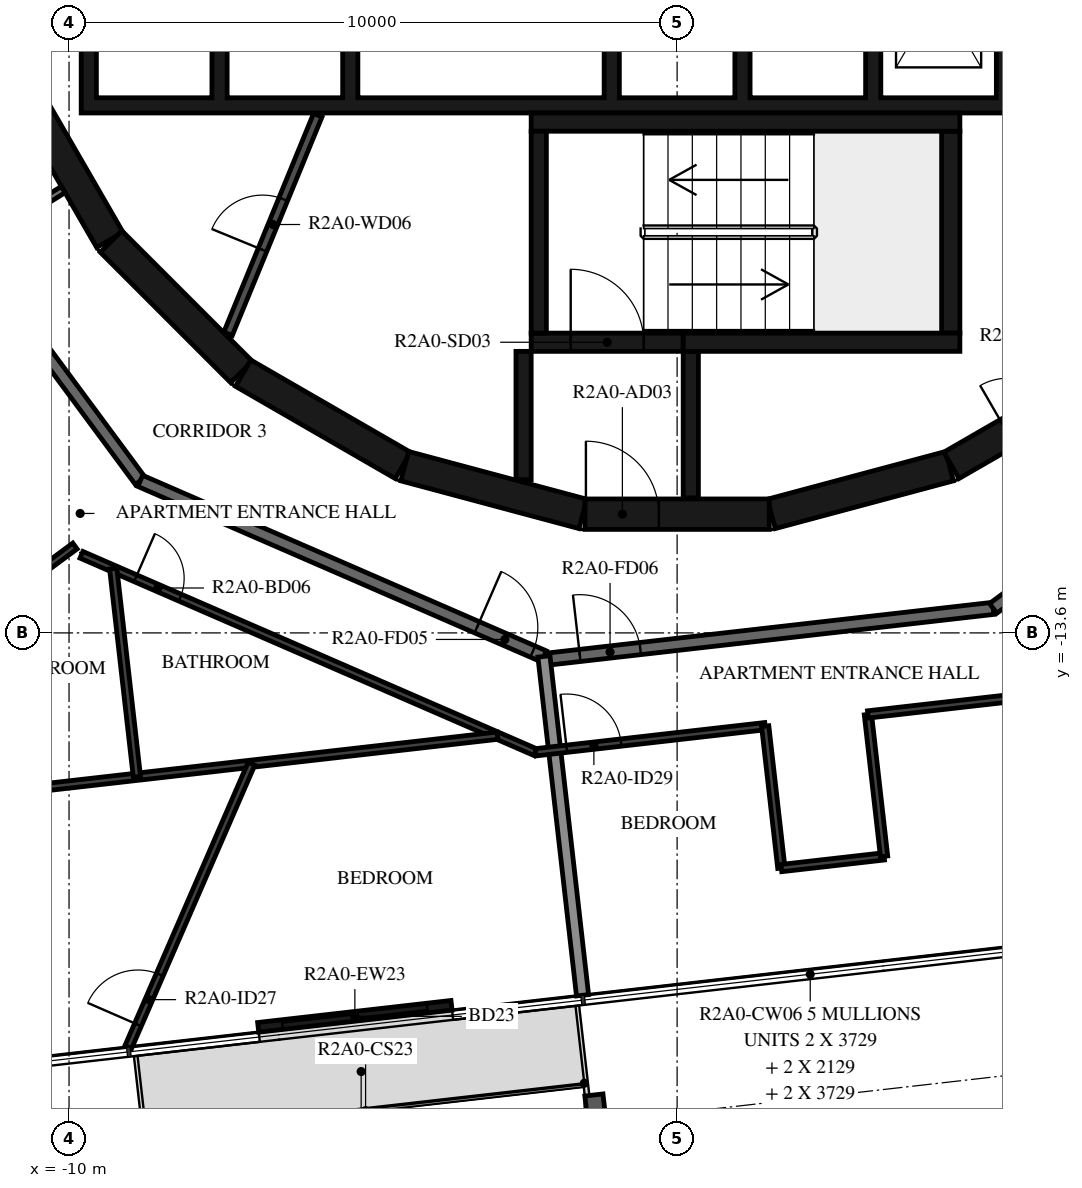
"""IFC4 building model, lengths in metres.
Left out: names, types, materials, properties, quantities, classifications, styles, units other than length and angle.
Written with IfcOpenShell. Run it as: python <this file> out.ifc"""

import sys

from ifc_helpers import new_model, si_unit, direction, frame, frame_2d, origin, origin_2d, place, context, subcontext, project, spatial, polyline, rectangle, i_section, outline, extrude, element, fill, save


model = new_model("IFC4")
c1 = context("Model", 3, precision=1e-05, world=origin(), true_north=direction((0.0, 1.0)))
c2 = subcontext(c1, "Body", "Model", "MODEL_VIEW")
j1 = project(units=[si_unit("LENGTHUNIT", "METRE"), si_unit("PLANEANGLEUNIT", "RADIAN")], contexts=[c1])
p1 = place(None, origin())
s1 = spatial("IfcSite", under=j1, at=p1, CompositionType="ELEMENT")
p2 = place(p1, origin())
s2 = spatial("IfcBuilding", under=s1, at=p2, CompositionType="ELEMENT")
p3 = place(p2, frame((0.0, 0.0, 83.7)))
s3 = spatial("IfcBuildingStorey", under=s2, at=p3, CompositionType="ELEMENT", Elevation=83.7)
p4 = place(p3, frame((-1.317, -21.646, -0.38), z_axis=(0.0, 0.0, 1.0), x_axis=(-0.993571881569, -0.113202986513, 0.0)))
e1 = element("IfcColumn", 1, at=p4, inside=s3, PredefinedType="COLUMN", context=c2, shape_type="SweptSolid", body=[
    extrude(i_section(OverallWidth=0.3, OverallDepth=0.9, WebThickness=0.019, FlangeThickness=0.035, FilletRadius=0.03, at=origin_2d()), origin(), (0.0, 0.0, 1.0), 3.5),
])
p5 = place(p3, frame((-6.889, -20.086, 0.0), z_axis=(0.0, 0.0, 1.0), x_axis=(0.993578576686, 0.113144208648, 0.0)))
e2 = element("IfcWall", 2, at=p5, inside=s3, PredefinedType="STANDARD", context=c2, shape_type="SweptSolid", body=[
    extrude(rectangle(XDim=3.2, YDim=0.16, at=frame_2d((1.6, 0.0))), origin(), (0.0, 0.0, 1.0), 3.12),
])
p6 = place(p5, frame((0.4, 0.0, 0.0)))
e3 = element("IfcOpeningElement", 3, at=p6, cuts=e2, PredefinedType="OPENING", context=c2, shape_type="SweptSolid", body=[
    extrude(rectangle(XDim=2.4, YDim=2.4, at=frame_2d((1.2, 1.2))), frame((0.0, 0.09, 0.0), z_axis=(0.0, -1.0, 0.0), x_axis=(1.0, 0.0, 0.0)), (0.0, 0.0, 1.0), 0.18),
])
p7 = place(p3, frame((1.55, -11.643, 0.0), z_axis=(0.0, 0.0, 1.0), x_axis=(0.965948410781, 0.258734743916, 0.0)))
e4 = element("IfcWall", 4, at=p7, inside=s3, PredefinedType="SHEAR", context=c2, shape_type="SweptSolid", body=[
    extrude(rectangle(XDim=3.033, YDim=0.5, at=frame_2d((1.516, 0.0))), origin(), (0.0, 0.0, 1.0), 3.12),
])
p8 = place(p3, frame((4.51, -10.845, 0.0), z_axis=(0.0, 0.0, 1.0), x_axis=(0.865975092491, 0.500087131594, 0.0)))
e5 = element("IfcWall", 5, at=p8, inside=s3, PredefinedType="SHEAR", context=c2, shape_type="SweptSolid", body=[
    extrude(rectangle(XDim=3.033, YDim=0.5, at=frame_2d((1.516, 0.0))), origin(), (0.0, 0.0, 1.0), 3.12),
])
p9 = place(p8, frame((1.066, 0.0, 0.0)))
e6 = element("IfcOpeningElement", 6, at=p9, cuts=e5, PredefinedType="OPENING", context=c2, shape_type="SweptSolid", body=[
    extrude(rectangle(XDim=0.9, YDim=2.1, at=frame_2d((0.45, 1.05))), frame((0.0, 0.26, 0.0), z_axis=(0.0, -1.0, 0.0), x_axis=(1.0, 0.0, 0.0)), (0.0, 0.0, 1.0), 0.52),
])
p10 = place(p3, frame((-10.845, -4.51, 0.0), z_axis=(0.0, 0.0, 1.0), x_axis=(0.500087131594, -0.865975092491, 0.0)))
e7 = element("IfcWall", 7, at=p10, inside=s3, PredefinedType="SHEAR", context=c2, shape_type="SweptSolid", body=[
    extrude(rectangle(XDim=3.033, YDim=0.5, at=frame_2d((1.516, 0.0))), origin(), (0.0, 0.0, 1.0), 3.12),
])
p11 = place(p3, frame((-9.308, -7.164, 0.0), z_axis=(0.0, 0.0, 1.0), x_axis=(0.707106781187, -0.707106781187, 0.0)))
e8 = element("IfcWall", 8, at=p11, inside=s3, PredefinedType="SHEAR", context=c2, shape_type="SweptSolid", body=[
    extrude(rectangle(XDim=3.032, YDim=0.5, at=frame_2d((1.516, 0.0))), origin(), (0.0, 0.0, 1.0), 3.12),
])
for number, where, z_axis, x_axis in (
    (9, (-7.137, -9.329, 0.0), (0.0, 0.0, 1.0), (0.866, -0.5, 0.0)),
    (10, (-4.479, -10.858, 0.0), (0.0, 0.0, 1.0), (0.966, -0.259, 0.0)),
):
    element("IfcWall", number, at=place(p3, frame(where, z_axis=z_axis, x_axis=x_axis)), inside=s3, PredefinedType="SHEAR", context=c2, shape_type="SweptSolid", body=[
        extrude(rectangle(XDim=3.033, YDim=0.5, at=frame_2d((1.516, 0.0))), origin(), (0.0, 0.0, 1.0), 3.12),
    ])
p12 = place(p3, frame((-1.516, -11.647, 0.0), z_axis=(0.0, 0.0, 1.0), x_axis=(1.0, 0.0, 0.0)))
e11 = element("IfcWall", 11, at=p12, inside=s3, PredefinedType="SHEAR", context=c2, shape_type="SweptSolid", body=[
    extrude(rectangle(XDim=3.033, YDim=0.5, at=frame_2d((1.516, 0.0))), origin(), (0.0, 0.0, 1.0), 3.12),
])
p13 = place(p12, frame((0.016, 0.0, 0.0)))
e12 = element("IfcOpeningElement", 12, at=p13, cuts=e11, PredefinedType="OPENING", context=c2, shape_type="SweptSolid", body=[
    extrude(rectangle(XDim=1.2, YDim=2.1, at=frame_2d((0.6, 1.05))), frame((0.0, 0.26, 0.0), z_axis=(0.0, -1.0, 0.0), x_axis=(1.0, 0.0, 0.0)), (0.0, 0.0, 1.0), 0.52),
])
p14 = place(p3, frame((-2.275, -8.67, 0.0), z_axis=(0.0, 0.0, 1.0), x_axis=(0.0, 1.0, 0.0)))
e13 = element("IfcWall", 13, at=p14, inside=s3, PredefinedType="SHEAR", context=c2, shape_type="SweptSolid", body=[
    extrude(rectangle(XDim=3.32, YDim=0.25, at=frame_2d((1.66, 0.0))), origin(), (0.0, 0.0, 1.0), 3.12),
])
p15 = place(p3, frame((-2.4, -5.2, 0.0), z_axis=(0.0, 0.0, 1.0), x_axis=(1.0, 0.0, 0.0)))
e14 = element("IfcWall", 14, at=p15, inside=s3, PredefinedType="SHEAR", context=c2, shape_type="SweptSolid", body=[
    extrude(rectangle(XDim=7.05, YDim=0.3, at=frame_2d((3.525, 0.0))), origin(), (0.0, 0.0, 1.0), 3.12),
])
p16 = place(p3, frame((4.5, -8.67, 0.0), z_axis=(0.0, 0.0, 1.0), x_axis=(0.0, 1.0, 0.0)))
e15 = element("IfcWall", 15, at=p16, inside=s3, PredefinedType="SHEAR", context=c2, shape_type="SweptSolid", body=[
    extrude(rectangle(XDim=3.32, YDim=0.3, at=frame_2d((1.66, 0.0))), origin(), (0.0, 0.0, 1.0), 3.12),
])
p17 = place(p3, frame((0.1, -8.82, 0.0), z_axis=(0.0, 0.0, 1.0), x_axis=(1.0, 0.0, 0.0)))
e16 = element("IfcWall", 16, at=p17, inside=s3, PredefinedType="SHEAR", context=c2, shape_type="SweptSolid", body=[
    extrude(rectangle(XDim=4.55, YDim=0.3, at=frame_2d((2.275, 0.0))), origin(), (0.0, 0.0, 1.0), 3.12),
])
p18 = place(p3, frame((-2.4, -8.82, 0.0), z_axis=(0.0, 0.0, 1.0), x_axis=(1.0, 0.0, 0.0)))
e17 = element("IfcWall", 17, at=p18, inside=s3, PredefinedType="SHEAR", context=c2, shape_type="SweptSolid", body=[
    extrude(rectangle(XDim=2.5, YDim=0.3, at=frame_2d((1.25, 0.0))), origin(), (0.0, 0.0, 1.0), 3.12),
])
p19 = place(p18, frame((0.65, 0.0, 0.0)))
e18 = element("IfcOpeningElement", 18, at=p19, cuts=e17, PredefinedType="OPENING", context=c2, shape_type="SweptSolid", body=[
    extrude(rectangle(XDim=1.2, YDim=2.1, at=frame_2d((0.6, 1.05))), frame((0.0, 0.16, 0.0), z_axis=(0.0, -1.0, 0.0), x_axis=(1.0, 0.0, 0.0)), (0.0, 0.0, 1.0), 0.32),
])
p20 = place(p3, frame((-2.525, -8.97, 0.0), z_axis=(0.0, 0.0, 1.0), x_axis=(0.0, -1.0, 0.0)))
e19 = element("IfcWall", 19, at=p20, inside=s3, PredefinedType="SHEAR", context=c2, shape_type="SweptSolid", body=[
    extrude(rectangle(XDim=2.11, YDim=0.25, at=frame_2d((1.055, 0.0))), origin(), (0.0, 0.0, 1.0), 3.12),
])
p21 = place(p3, frame((0.225, -8.97, 0.0), z_axis=(0.0, 0.0, 1.0), x_axis=(0.0, -1.0, 0.0)))
e20 = element("IfcWall", 20, at=p21, inside=s3, PredefinedType="SHEAR", context=c2, shape_type="SweptSolid", body=[
    extrude(rectangle(XDim=2.41, YDim=0.25, at=frame_2d((1.205, 0.0))), origin(), (0.0, 0.0, 1.0), 3.12),
])
p22 = place(p3, origin())
e21 = element("IfcWall", 21, at=p22, inside=s3, PredefinedType="SHEAR", context=c2, shape_type="SweptSolid", body=[
    extrude(outline(polyline([(9.8, -5.05), (9.8, -4.8), (9.8, -1.9), (9.55, -1.9), (9.55, -4.8), (7.65, -4.8), (7.65, -1.9), (7.4, -1.9), (7.4, -4.8), (5.5, -4.8), (5.5, -1.9), (5.25, -1.9), (5.25, -4.8), (3.35, -4.8), (3.35, -1.9), (3.1, -1.9), (3.1, -4.8), (1.2, -4.8), (1.2, -1.9), (0.95, -1.9), (0.95, -4.8), (-0.95, -4.8), (-0.95, -1.9), (-1.2, -1.9), (-1.2, -4.8), (-5.25, -4.8), (-5.25, -1.9), (-5.5, -1.9), (-5.5, -4.8), (-7.4, -4.8), (-7.4, -1.9), (-7.65, -1.9), (-7.65, -4.8), (-9.55, -4.8), (-9.55, -1.9), (-9.8, -1.9), (-9.8, -4.8), (-9.8, -5.05), (9.8, -5.05)])), origin(), (0.0, 0.0, 1.0), 3.12),
])
p23 = place(p3, frame((-7.385, -8.681, 0.0), z_axis=(0.0, 0.0, 1.0), x_axis=(0.379804590409, 0.925066739811, 0.0)))
e22 = element("IfcWall", 22, at=p23, inside=s3, PredefinedType="PARTITIONING", context=c2, shape_type="SweptSolid", body=[
    extrude(rectangle(XDim=3.885, YDim=0.15, at=frame_2d((1.942, 0.0))), origin(), (0.0, 0.0, 1.0), 3.12),
])
p24 = place(p23, frame((1.493, 0.0, 0.0)))
e23 = element("IfcOpeningElement", 23, at=p24, cuts=e22, PredefinedType="OPENING", context=c2, shape_type="SweptSolid", body=[
    extrude(rectangle(XDim=0.9, YDim=2.1, at=frame_2d((0.45, 1.05))), frame((0.0, 0.085, 0.0), z_axis=(0.0, -1.0, 0.0), x_axis=(1.0, 0.0, 0.0)), (0.0, 0.0, 1.0), 0.17),
])
p25 = place(p3, frame((-11.654, -7.282, 0.0), z_axis=(0.0, 0.0, 1.0), x_axis=(0.848117698675, 0.529807860638, 0.0)))
e24 = element("IfcWall", 24, at=p25, inside=s3, PredefinedType="PARTITIONING", context=c2, shape_type="SweptSolid", body=[
    extrude(rectangle(XDim=1.838, YDim=0.12, at=frame_2d((0.919, 0.0))), origin(), (0.0, 0.0, 1.0), 3.12),
])
p26 = place(p25, frame((0.115, 0.0, 0.0)))
e25 = element("IfcOpeningElement", 25, at=p26, cuts=e24, PredefinedType="OPENING", context=c2, shape_type="SweptSolid", body=[
    extrude(rectangle(XDim=1.2, YDim=2.1, at=frame_2d((0.6, 1.05))), frame((0.0, 0.07, 0.0), z_axis=(0.0, -1.0, 0.0), x_axis=(1.0, 0.0, 0.0)), (0.0, 0.0, 1.0), 0.14),
])
p27 = place(p3, frame((-13.196, -5.198, 0.0), z_axis=(0.0, 0.0, 1.0), x_axis=(0.594805187394, -0.803869883159, 0.0)))
e26 = element("IfcWall", 26, at=p27, inside=s3, PredefinedType="STANDARD", context=c2, shape_type="SweptSolid", body=[
    extrude(rectangle(XDim=7.342, YDim=0.2, at=frame_2d((3.671, 0.0))), origin(), (0.0, 0.0, 1.0), 3.12),
])
p28 = place(p3, frame((-8.829, -11.1, 0.0), z_axis=(0.0, 0.0, 1.0), x_axis=(0.917063622491, -0.398740908742, 0.0)))
e27 = element("IfcWall", 27, at=p28, inside=s3, PredefinedType="STANDARD", context=c2, shape_type="SweptSolid", body=[
    extrude(rectangle(XDim=7.24, YDim=0.2, at=frame_2d((3.62, 0.0))), origin(), (0.0, 0.0, 1.0), 3.12),
])
p29 = place(p28, frame((6.04, 0.0, 0.0)))
e28 = element("IfcOpeningElement", 28, at=p29, cuts=e27, PredefinedType="OPENING", context=c2, shape_type="SweptSolid", body=[
    extrude(rectangle(XDim=1.0, YDim=2.1, at=frame_2d((0.5, 1.05))), frame((0.0, 0.11, 0.0), z_axis=(0.0, -1.0, 0.0), x_axis=(1.0, 0.0, 0.0)), (0.0, 0.0, 1.0), 0.22),
])
p30 = place(p3, frame((-2.096, -14.028, 0.0), z_axis=(0.0, 0.0, 1.0), x_axis=(0.993569170114, 0.113226782163, 0.0)))
e29 = element("IfcWall", 29, at=p30, inside=s3, PredefinedType="STANDARD", context=c2, shape_type="SweptSolid", body=[
    extrude(rectangle(XDim=7.342, YDim=0.2, at=frame_2d((3.671, 0.0))), origin(), (0.0, 0.0, 1.0), 3.12),
])
p31 = place(p30, frame((0.5, 0.0, 0.0)))
e30 = element("IfcOpeningElement", 30, at=p31, cuts=e29, PredefinedType="OPENING", context=c2, shape_type="SweptSolid", body=[
    extrude(rectangle(XDim=1.0, YDim=2.1, at=frame_2d((0.5, 1.05))), frame((0.0, 0.11, 0.0), z_axis=(0.0, -1.0, 0.0), x_axis=(1.0, 0.0, 0.0)), (0.0, 0.0, 1.0), 0.22),
])
p32 = place(p3, frame((5.198, -13.196, 0.0), z_axis=(0.0, 0.0, 1.0), x_axis=(0.803869883159, 0.594805187394, 0.0)))
e31 = element("IfcWall", 31, at=p32, inside=s3, PredefinedType="STANDARD", context=c2, shape_type="SweptSolid", body=[
    extrude(rectangle(XDim=7.342, YDim=0.2, at=frame_2d((3.671, 0.0))), origin(), (0.0, 0.0, 1.0), 3.12),
])
p33 = place(p3, frame((-1.555, -19.559, 0.0), z_axis=(0.0, 0.0, 1.0), x_axis=(-0.113221250863, 0.993569800443, 0.0)))
e32 = element("IfcWall", 32, at=p33, inside=s3, PredefinedType="STANDARD", context=c2, shape_type="SweptSolid", body=[
    extrude(rectangle(XDim=5.609, YDim=0.2, at=frame_2d((2.804, 0.0))), origin(), (0.0, 0.0, 1.0), 2.73),
])
p34 = place(p3, frame((-13.125, -14.555, 0.0), z_axis=(0.0, 0.0, 1.0), x_axis=(0.80389374229, 0.594772940799, 0.0)))
e33 = element("IfcWall", 33, at=p34, inside=s3, PredefinedType="PARTITIONING", context=c2, shape_type="SweptSolid", body=[
    extrude(rectangle(XDim=4.008, YDim=0.12, at=frame_2d((2.004, 0.0))), origin(), (0.0, 0.0, 1.0), 3.12),
])
p35 = place(p3, frame((-9.796, -12.315, 0.0), z_axis=(0.0, 0.0, 1.0), x_axis=(0.917059572812, -0.398750222463, 0.0)))
e34 = element("IfcWall", 34, at=p35, inside=s3, PredefinedType="PARTITIONING", context=c2, shape_type="SweptSolid", body=[
    extrude(rectangle(XDim=8.146, YDim=0.12, at=frame_2d((4.073, 0.0))), origin(), (0.0, 0.0, 1.0), 3.12),
])
p36 = place(p35, frame((0.969, 0.0, 0.0)))
e35 = element("IfcOpeningElement", 35, at=p36, cuts=e34, PredefinedType="OPENING", context=c2, shape_type="SweptSolid", body=[
    extrude(rectangle(XDim=0.8, YDim=2.1, at=frame_2d((0.4, 1.05))), frame((0.0, 0.07, 0.0), z_axis=(0.0, -1.0, 0.0), x_axis=(1.0, 0.0, 0.0)), (0.0, 0.0, 1.0), 0.14),
])
p37 = place(p3, frame((-2.326, -15.563, 0.0), z_axis=(0.0, 0.0, 1.0), x_axis=(0.993575068384, 0.113175012641, 0.0)))
e36 = element("IfcWall", 36, at=p37, inside=s3, PredefinedType="PARTITIONING", context=c2, shape_type="SweptSolid", body=[
    extrude(rectangle(XDim=3.799, YDim=0.12, at=frame_2d((1.899, 0.0))), origin(), (0.0, 0.0, 1.0), 3.12),
])
p38 = place(p37, frame((0.513, 0.0, 0.0)))
e37 = element("IfcOpeningElement", 37, at=p38, cuts=e36, PredefinedType="OPENING", context=c2, shape_type="SweptSolid", body=[
    extrude(rectangle(XDim=0.9, YDim=2.1, at=frame_2d((0.45, 1.05))), frame((0.0, 0.07, 0.0), z_axis=(0.0, -1.0, 0.0), x_axis=(1.0, 0.0, 0.0)), (0.0, 0.0, 1.0), 0.14),
])
p39 = place(p3, frame((-17.437, -16.94, 0.0), z_axis=(0.0, 0.0, 1.0), x_axis=(0.993573314119, 0.113190412448, 0.0)))
e38 = element("IfcWall", 38, at=p39, inside=s3, PredefinedType="PARTITIONING", context=c2, shape_type="SweptSolid", body=[
    extrude(rectangle(XDim=14.576, YDim=0.12, at=frame_2d((7.288, 0.0))), origin(), (0.0, 0.0, 1.0), 3.12),
])
p40 = place(p39, frame((3.201, 0.0, 0.0)))
e39 = element("IfcOpeningElement", 39, at=p40, cuts=e38, PredefinedType="OPENING", context=c2, shape_type="SweptSolid", body=[
    extrude(rectangle(XDim=0.9, YDim=2.1, at=frame_2d((0.45, 1.05))), frame((0.0, 0.07, 0.0), z_axis=(0.0, -1.0, 0.0), x_axis=(1.0, 0.0, 0.0)), (0.0, 0.0, 1.0), 0.14),
])
p41 = place(p39, frame((0.645, 0.0, 0.0)))
e40 = element("IfcOpeningElement", 40, at=p41, cuts=e38, PredefinedType="OPENING", context=c2, shape_type="SweptSolid", body=[
    extrude(rectangle(XDim=0.9, YDim=2.1, at=frame_2d((0.45, 1.05))), frame((0.0, 0.07, 0.0), z_axis=(0.0, -1.0, 0.0), x_axis=(1.0, 0.0, 0.0)), (0.0, 0.0, 1.0), 0.14),
])
p42 = place(p3, frame((-8.884, -15.966, 0.0), z_axis=(0.0, 0.0, 1.0), x_axis=(-0.113230836929, 0.993568708026, 0.0)))
e41 = element("IfcWall", 41, at=p42, inside=s3, PredefinedType="PARTITIONING", context=c2, shape_type="SweptSolid", body=[
    extrude(rectangle(XDim=3.446, YDim=0.12, at=frame_2d((1.723, 0.0))), origin(), (0.0, 0.0, 1.0), 3.12),
])
p43 = place(p3, frame((-9.026, -20.41, 0.0), z_axis=(0.0, 0.0, 1.0), x_axis=(0.398750711167, 0.917059360316, 0.0)))
e42 = element("IfcWall", 42, at=p43, inside=s3, PredefinedType="PARTITIONING", context=c2, shape_type="SweptSolid", body=[
    extrude(rectangle(XDim=5.081, YDim=0.12, at=frame_2d((2.54, 0.0))), origin(), (0.0, 0.0, 1.0), 3.12),
])
p44 = place(p43, frame((0.4, 0.0, 0.0)))
e43 = element("IfcOpeningElement", 43, at=p44, cuts=e42, PredefinedType="OPENING", context=c2, shape_type="SweptSolid", body=[
    extrude(rectangle(XDim=0.9, YDim=2.1, at=frame_2d((0.45, 1.05))), frame((0.0, 0.07, 0.0), z_axis=(0.0, -1.0, 0.0), x_axis=(1.0, 0.0, 0.0)), (0.0, 0.0, 1.0), 0.14),
])
p45 = place(p3, frame((1.448, -15.133, 0.0), z_axis=(0.0, 0.0, 1.0), x_axis=(0.113180189053, -0.993574478741, 0.0)))
e44 = element("IfcWall", 44, at=p45, inside=s3, PredefinedType="PARTITIONING", context=c2, shape_type="SweptSolid", body=[
    extrude(rectangle(XDim=2.349, YDim=0.12, at=frame_2d((1.175, 0.0))), origin(), (0.0, 0.0, 1.0), 3.12),
])
p46 = place(p3, frame((1.714, -17.467, 0.0), z_axis=(0.0, 0.0, 1.0), x_axis=(0.993577030812, 0.113157782957, 0.0)))
e45 = element("IfcWall", 45, at=p46, inside=s3, PredefinedType="PARTITIONING", context=c2, shape_type="SweptSolid", body=[
    extrude(rectangle(XDim=1.7, YDim=0.12, at=frame_2d((0.85, 0.0))), origin(), (0.0, 0.0, 1.0), 3.12),
])
p47 = place(p3, frame((3.404, -17.275, 0.0), z_axis=(0.0, 0.0, 1.0), x_axis=(-0.113180189053, 0.993574478741, 0.0)))
e46 = element("IfcWall", 46, at=p47, inside=s3, PredefinedType="PARTITIONING", context=c2, shape_type="SweptSolid", body=[
    extrude(rectangle(XDim=2.349, YDim=0.12, at=frame_2d((1.175, 0.0))), origin(), (0.0, 0.0, 1.0), 3.12),
])
p48 = place(p3, frame((3.138, -14.941, 0.0), z_axis=(0.0, 0.0, 1.0), x_axis=(0.99356355736, 0.113276023437, 0.0)))
e47 = element("IfcWall", 47, at=p48, inside=s3, PredefinedType="PARTITIONING", context=c2, shape_type="SweptSolid", body=[
    extrude(rectangle(XDim=2.647, YDim=0.12, at=frame_2d((1.323, 0.0))), origin(), (0.0, 0.0, 1.0), 3.12),
])
p49 = place(p6, origin())
e48 = element("IfcDoor", 48, at=p49, inside=s3, OperationType="DOUBLE_DOOR_SLIDING", PredefinedType="DOOR", context=c2, shape_type="SweptSolid", body=[
    extrude(rectangle(XDim=2.4, YDim=2.4, at=frame_2d((1.2, 1.2))), frame((0.0, 0.025, 0.0), z_axis=(0.0, -1.0, 0.0), x_axis=(1.0, 0.0, 0.0)), (0.0, 0.0, 1.0), 0.05),
])
fill(e3, e48)
p50 = place(p19, origin())
e49 = element("IfcDoor", 49, at=p50, inside=s3, OperationType="SINGLE_SWING_LEFT", PredefinedType="DOOR", context=c2, shape_type="SweptSolid", body=[
    extrude(rectangle(XDim=1.2, YDim=2.1, at=frame_2d((0.6, 1.05))), frame((0.0, 0.025, 0.0), z_axis=(0.0, -1.0, 0.0), x_axis=(1.0, 0.0, 0.0)), (0.0, 0.0, 1.0), 0.05),
])
fill(e18, e49)
p51 = place(p13, origin())
e50 = element("IfcDoor", 50, at=p51, inside=s3, OperationType="SINGLE_SWING_RIGHT", PredefinedType="DOOR", context=c2, shape_type="SweptSolid", body=[
    extrude(rectangle(XDim=1.2, YDim=2.1, at=frame_2d((0.6, 1.05))), frame((0.0, 0.025, 0.0), z_axis=(0.0, -1.0, 0.0), x_axis=(1.0, 0.0, 0.0)), (0.0, 0.0, 1.0), 0.05),
])
fill(e12, e50)
p52 = place(p24, origin())
e51 = element("IfcDoor", 51, at=p52, inside=s3, OperationType="SINGLE_SWING_LEFT", PredefinedType="DOOR", context=c2, shape_type="SweptSolid", body=[
    extrude(rectangle(XDim=0.9, YDim=2.1, at=frame_2d((0.45, 1.05))), frame((0.0, 0.025, 0.0), z_axis=(0.0, -1.0, 0.0), x_axis=(1.0, 0.0, 0.0)), (0.0, 0.0, 1.0), 0.05),
])
fill(e23, e51)
p53 = place(p29, origin())
e52 = element("IfcDoor", 52, at=p53, inside=s3, OperationType="SINGLE_SWING_LEFT", PredefinedType="DOOR", context=c2, shape_type="SweptSolid", body=[
    extrude(rectangle(XDim=1.0, YDim=2.1, at=frame_2d((0.5, 1.05))), frame((0.0, 0.025, 0.0), z_axis=(0.0, -1.0, 0.0), x_axis=(1.0, 0.0, 0.0)), (0.0, 0.0, 1.0), 0.05),
])
fill(e28, e52)
p54 = place(p36, origin())
e53 = element("IfcDoor", 53, at=p54, inside=s3, OperationType="SINGLE_SWING_LEFT", PredefinedType="DOOR", context=c2, shape_type="SweptSolid", body=[
    extrude(rectangle(XDim=0.8, YDim=2.1, at=frame_2d((0.4, 1.05))), frame((0.0, 0.025, 0.0), z_axis=(0.0, -1.0, 0.0), x_axis=(1.0, 0.0, 0.0)), (0.0, 0.0, 1.0), 0.05),
])
fill(e35, e53)
p55 = place(p44, origin())
e54 = element("IfcDoor", 54, at=p55, inside=s3, OperationType="SINGLE_SWING_RIGHT", PredefinedType="DOOR", context=c2, shape_type="SweptSolid", body=[
    extrude(rectangle(XDim=0.9, YDim=2.1, at=frame_2d((0.45, 1.05))), frame((0.0, 0.025, 0.0), z_axis=(0.0, -1.0, 0.0), x_axis=(1.0, 0.0, 0.0)), (0.0, 0.0, 1.0), 0.05),
])
fill(e43, e54)
p56 = place(p31, origin())
e55 = element("IfcDoor", 55, at=p56, inside=s3, OperationType="SINGLE_SWING_LEFT", PredefinedType="DOOR", context=c2, shape_type="SweptSolid", body=[
    extrude(rectangle(XDim=1.0, YDim=2.1, at=frame_2d((0.5, 1.05))), frame((0.0, 0.025, 0.0), z_axis=(0.0, -1.0, 0.0), x_axis=(1.0, 0.0, 0.0)), (0.0, 0.0, 1.0), 0.05),
])
fill(e30, e55)
p57 = place(p38, origin())
e56 = element("IfcDoor", 56, at=p57, inside=s3, OperationType="SINGLE_SWING_LEFT", PredefinedType="DOOR", context=c2, shape_type="SweptSolid", body=[
    extrude(rectangle(XDim=0.9, YDim=2.1, at=frame_2d((0.45, 1.05))), frame((0.0, 0.025, 0.0), z_axis=(0.0, -1.0, 0.0), x_axis=(1.0, 0.0, 0.0)), (0.0, 0.0, 1.0), 0.05),
])
fill(e37, e56)
save(model, sys.argv[1])
